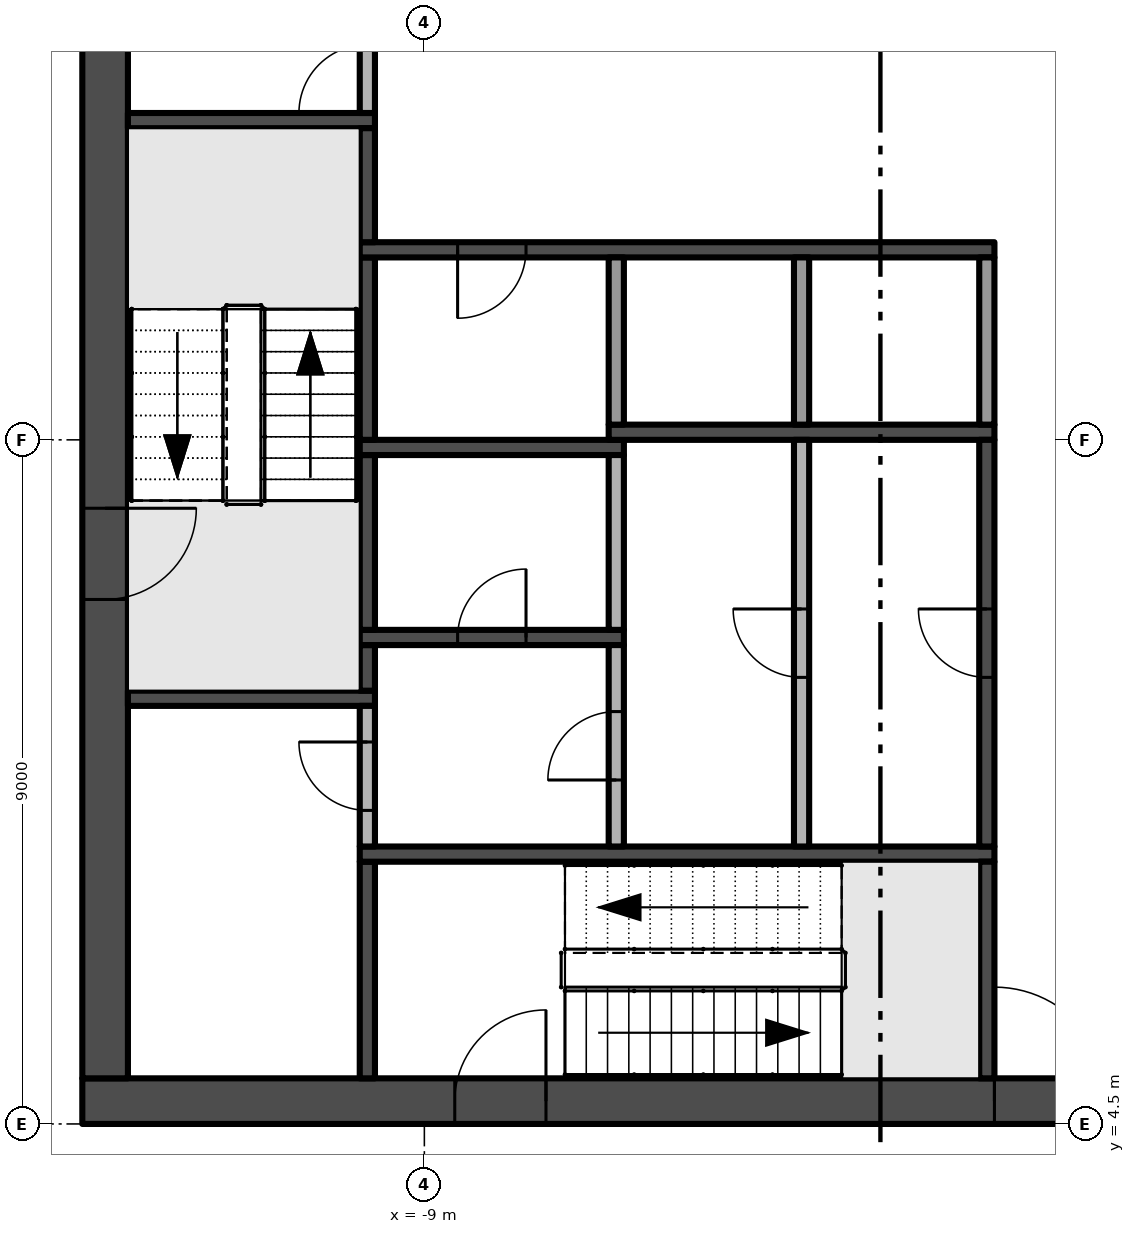
"""IFC4 building model, lengths in metres.
Left out: names, types, materials, properties, quantities, classifications, styles, units other than length and angle.
Written with IfcOpenShell. Run it as: python <this file> out.ifc"""

import sys

from ifc_helpers import new_model, si_unit, direction, frame, frame_2d, origin, place, context, subcontext, project, spatial, rectangle, extrude, element, fill, save


model = new_model("IFC4")
c1 = context("Model", 3, precision=1e-05, world=origin(), true_north=direction((0.0, 1.0)))
c2 = subcontext(c1, "Body", "Model", "MODEL_VIEW")
j1 = project(units=[si_unit("LENGTHUNIT", "METRE"), si_unit("PLANEANGLEUNIT", "RADIAN")], contexts=[c1])
p1 = place(None, origin())
s1 = spatial("IfcSite", under=j1, at=p1, CompositionType="ELEMENT")
p2 = place(p1, origin())
s2 = spatial("IfcBuilding", under=s1, at=p2, CompositionType="ELEMENT")
p3 = place(p2, frame((0.0, 0.0, 233.8)))
s3 = spatial("IfcBuildingStorey", under=s2, at=p3, CompositionType="ELEMENT", Elevation=233.8)
p4 = place(p3, frame((-13.5, 4.8, -0.3), z_axis=(0.0, 0.0, 1.0), x_axis=(1.0, 0.0, 0.0)))
e1 = element("IfcWall", 1, at=p4, inside=s3, PredefinedType="SHEAR", context=c2, shape_type="SweptSolid", body=[
    extrude(rectangle(XDim=27.0, YDim=0.6, at=frame_2d((13.5, 0.0))), origin(), (0.0, 0.0, 1.0), 5.0),
])
p5 = place(p4, frame((12.0, 0.0, 0.3)))
e2 = element("IfcOpeningElement", 2, at=p5, cuts=e1, PredefinedType="OPENING", context=c2, shape_type="SweptSolid", body=[
    extrude(rectangle(XDim=3.0, YDim=2.4, at=frame_2d((1.5, 1.2))), frame((0.0, 0.31, 0.0), z_axis=(0.0, -1.0, 0.0), x_axis=(1.0, 0.0, 0.0)), (0.0, 0.0, 1.0), 0.62),
])
p6 = place(p4, frame((4.9, 0.0, 0.3)))
e3 = element("IfcOpeningElement", 3, at=p6, cuts=e1, PredefinedType="OPENING", context=c2, shape_type="SweptSolid", body=[
    extrude(rectangle(XDim=1.2, YDim=2.2, at=frame_2d((0.6, 1.1))), frame((0.0, 0.31, 0.0), z_axis=(0.0, -1.0, 0.0), x_axis=(1.0, 0.0, 0.0)), (0.0, 0.0, 1.0), 0.62),
])
p7 = place(p4, frame((20.75, 0.0, 0.3)))
e4 = element("IfcOpeningElement", 4, at=p7, cuts=e1, PredefinedType="OPENING", context=c2, shape_type="SweptSolid", body=[
    extrude(rectangle(XDim=1.5, YDim=2.2, at=frame_2d((0.75, 1.1))), frame((0.0, 0.31, 0.0), z_axis=(0.0, -1.0, 0.0), x_axis=(1.0, 0.0, 0.0)), (0.0, 0.0, 1.0), 0.62),
])
p8 = place(p4, frame((17.4, 0.0, 0.3)))
e5 = element("IfcOpeningElement", 5, at=p8, cuts=e1, PredefinedType="OPENING", context=c2, shape_type="SweptSolid", body=[
    extrude(rectangle(XDim=1.2, YDim=2.2, at=frame_2d((0.6, 1.1))), frame((0.0, 0.31, 0.0), z_axis=(0.0, -1.0, 0.0), x_axis=(1.0, 0.0, 0.0)), (0.0, 0.0, 1.0), 0.62),
])
p9 = place(p3, frame((-13.2, 21.9, -0.3), z_axis=(0.0, 0.0, 1.0), x_axis=(0.0, -1.0, 0.0)))
e6 = element("IfcWall", 6, at=p9, inside=s3, PredefinedType="SHEAR", context=c2, shape_type="SweptSolid", body=[
    extrude(rectangle(XDim=16.8, YDim=0.6, at=frame_2d((8.4, 0.0))), origin(), (0.0, 0.0, 1.0), 5.0),
])
p10 = place(p9, frame((9.3, 0.0, 0.3)))
e7 = element("IfcOpeningElement", 7, at=p10, cuts=e6, PredefinedType="OPENING", context=c2, shape_type="SweptSolid", body=[
    extrude(rectangle(XDim=1.2, YDim=2.2, at=frame_2d((0.6, 1.1))), frame((0.0, 0.31, 0.0), z_axis=(0.0, -1.0, 0.0), x_axis=(1.0, 0.0, 0.0)), (0.0, 0.0, 1.0), 0.62),
])
for number, where, z_axis, x_axis in (
    (8, (-12.9, 10.1, 0.0), (0.0, 0.0, 1.0), (1.0, 0.0, 0.0)),
    (9, (-12.9, 17.7, 0.0), (0.0, 0.0, 1.0), (1.0, 0.0, 0.0)),
):
    element("IfcWall", number, at=place(p3, frame(where, z_axis=z_axis, x_axis=x_axis)), inside=s3, PredefinedType="SHEAR", context=c2, shape_type="SweptSolid", body=[
        extrude(rectangle(XDim=3.25, YDim=0.2, at=frame_2d((1.625, 0.0))), origin(), (0.0, 0.0, 1.0), 4.7),
    ])
p11 = place(p3, frame((-9.75, 5.1, 0.0), z_axis=(0.0, 0.0, 1.0), x_axis=(0.0, 1.0, 0.0)))
e10 = element("IfcWall", 10, at=p11, inside=s3, PredefinedType="SHEAR", context=c2, shape_type="SweptSolid", body=[
    extrude(rectangle(XDim=2.85, YDim=0.2, at=frame_2d((1.425, 0.0))), origin(), (0.0, 0.0, 1.0), 4.7),
])
p12 = place(p3, frame((-9.85, 8.05, 0.0), z_axis=(0.0, 0.0, 1.0), x_axis=(1.0, 0.0, 0.0)))
e11 = element("IfcWall", 11, at=p12, inside=s3, PredefinedType="SHEAR", context=c2, shape_type="SweptSolid", body=[
    extrude(rectangle(XDim=8.35, YDim=0.2, at=frame_2d((4.175, 0.0))), origin(), (0.0, 0.0, 1.0), 4.7),
])
p13 = place(p3, frame((-9.75, 8.15, 0.0), z_axis=(0.0, 0.0, 1.0), x_axis=(0.0, 1.0, 0.0)))
e12 = element("IfcWall", 12, at=p13, inside=s3, PredefinedType="PARTITIONING", context=c2, shape_type="SweptSolid", body=[
    extrude(rectangle(XDim=1.85, YDim=0.2, at=frame_2d((0.925, 0.0))), origin(), (0.0, 0.0, 1.0), 4.7),
])
p14 = place(p13, frame((0.475, 0.0, 0.0)))
e13 = element("IfcOpeningElement", 13, at=p14, cuts=e12, PredefinedType="OPENING", context=c2, shape_type="SweptSolid", body=[
    extrude(rectangle(XDim=0.9, YDim=2.1, at=frame_2d((0.45, 1.05))), frame((0.0, 0.11, 0.0), z_axis=(0.0, -1.0, 0.0), x_axis=(1.0, 0.0, 0.0)), (0.0, 0.0, 1.0), 0.22),
])
p15 = place(p3, frame((-9.75, 10.2, 0.0), z_axis=(0.0, 0.0, 1.0), x_axis=(0.0, 1.0, 0.0)))
e14 = element("IfcWall", 14, at=p15, inside=s3, PredefinedType="SHEAR", context=c2, shape_type="SweptSolid", body=[
    extrude(rectangle(XDim=0.6, YDim=0.2, at=frame_2d((0.3, 0.0))), origin(), (0.0, 0.0, 1.0), 4.7),
])
p16 = place(p3, frame((-9.85, 10.9, 0.0), z_axis=(0.0, 0.0, 1.0), x_axis=(1.0, 0.0, 0.0)))
e15 = element("IfcWall", 15, at=p16, inside=s3, PredefinedType="SHEAR", context=c2, shape_type="SweptSolid", body=[
    extrude(rectangle(XDim=3.475, YDim=0.2, at=frame_2d((1.738, 0.0))), origin(), (0.0, 0.0, 1.0), 4.7),
])
p17 = place(p16, frame((1.288, 0.0, 0.0)))
e16 = element("IfcOpeningElement", 16, at=p17, cuts=e15, PredefinedType="OPENING", context=c2, shape_type="SweptSolid", body=[
    extrude(rectangle(XDim=0.9, YDim=2.1, at=frame_2d((0.45, 1.05))), frame((0.0, 0.11, 0.0), z_axis=(0.0, -1.0, 0.0), x_axis=(1.0, 0.0, 0.0)), (0.0, 0.0, 1.0), 0.22),
])
p18 = place(p3, frame((-9.75, 11.0, 0.0), z_axis=(0.0, 0.0, 1.0), x_axis=(0.0, 1.0, 0.0)))
e17 = element("IfcWall", 17, at=p18, inside=s3, PredefinedType="SHEAR", context=c2, shape_type="SweptSolid", body=[
    extrude(rectangle(XDim=2.3, YDim=0.2, at=frame_2d((1.15, 0.0))), origin(), (0.0, 0.0, 1.0), 4.7),
])
p19 = place(p3, frame((-9.85, 13.4, 0.0), z_axis=(0.0, 0.0, 1.0), x_axis=(1.0, 0.0, 0.0)))
e18 = element("IfcWall", 18, at=p19, inside=s3, PredefinedType="SHEAR", context=c2, shape_type="SweptSolid", body=[
    extrude(rectangle(XDim=3.475, YDim=0.2, at=frame_2d((1.738, 0.0))), origin(), (0.0, 0.0, 1.0), 4.7),
])
p20 = place(p3, frame((-9.75, 13.5, 0.0), z_axis=(0.0, 0.0, 1.0), x_axis=(0.0, 1.0, 0.0)))
e19 = element("IfcWall", 19, at=p20, inside=s3, PredefinedType="SHEAR", context=c2, shape_type="SweptSolid", body=[
    extrude(rectangle(XDim=2.4, YDim=0.2, at=frame_2d((1.2, 0.0))), origin(), (0.0, 0.0, 1.0), 4.7),
])
p21 = place(p3, frame((-1.5, 16.0, 0.0), z_axis=(0.0, 0.0, 1.0), x_axis=(-1.0, 0.0, 0.0)))
e20 = element("IfcWall", 20, at=p21, inside=s3, PredefinedType="SHEAR", context=c2, shape_type="SweptSolid", body=[
    extrude(rectangle(XDim=8.35, YDim=0.2, at=frame_2d((4.175, 0.0))), origin(), (0.0, 0.0, 1.0), 4.7),
])
p22 = place(p21, frame((6.162, 0.0, 0.0)))
e21 = element("IfcOpeningElement", 21, at=p22, cuts=e20, PredefinedType="OPENING", context=c2, shape_type="SweptSolid", body=[
    extrude(rectangle(XDim=0.9, YDim=2.1, at=frame_2d((0.45, 1.05))), frame((0.0, 0.11, 0.0), z_axis=(0.0, -1.0, 0.0), x_axis=(1.0, 0.0, 0.0)), (0.0, 0.0, 1.0), 0.22),
])
p23 = place(p3, frame((-9.75, 16.1, 0.0), z_axis=(0.0, 0.0, 1.0), x_axis=(0.0, 1.0, 0.0)))
e22 = element("IfcWall", 22, at=p23, inside=s3, PredefinedType="SHEAR", context=c2, shape_type="SweptSolid", body=[
    extrude(rectangle(XDim=1.5, YDim=0.2, at=frame_2d((0.75, 0.0))), origin(), (0.0, 0.0, 1.0), 4.7),
])
p24 = place(p3, frame((-9.75, 17.8, 0.0), z_axis=(0.0, 0.0, 1.0), x_axis=(0.0, 1.0, 0.0)))
e23 = element("IfcWall", 23, at=p24, inside=s3, PredefinedType="PARTITIONING", context=c2, shape_type="SweptSolid", body=[
    extrude(rectangle(XDim=1.4, YDim=0.2, at=frame_2d((0.7, 0.0))), origin(), (0.0, 0.0, 1.0), 4.7),
])
p25 = place(p24, origin())
e24 = element("IfcOpeningElement", 24, at=p25, cuts=e23, PredefinedType="OPENING", context=c2, shape_type="SweptSolid", body=[
    extrude(rectangle(XDim=0.9, YDim=2.1, at=frame_2d((0.45, 1.05))), frame((0.0, 0.11, 0.0), z_axis=(0.0, -1.0, 0.0), x_axis=(1.0, 0.0, 0.0)), (0.0, 0.0, 1.0), 0.22),
])
p26 = place(p3, frame((-6.475, 8.15, 0.0), z_axis=(0.0, 0.0, 1.0), x_axis=(0.0, 1.0, 0.0)))
e25 = element("IfcWall", 25, at=p26, inside=s3, PredefinedType="PARTITIONING", context=c2, shape_type="SweptSolid", body=[
    extrude(rectangle(XDim=2.65, YDim=0.2, at=frame_2d((1.325, 0.0))), origin(), (0.0, 0.0, 1.0), 4.7),
])
p27 = place(p26, frame((0.875, 0.0, 0.0)))
e26 = element("IfcOpeningElement", 26, at=p27, cuts=e25, PredefinedType="OPENING", context=c2, shape_type="SweptSolid", body=[
    extrude(rectangle(XDim=0.9, YDim=2.1, at=frame_2d((0.45, 1.05))), frame((0.0, 0.11, 0.0), z_axis=(0.0, -1.0, 0.0), x_axis=(1.0, 0.0, 0.0)), (0.0, 0.0, 1.0), 0.22),
])
p28 = place(p3, frame((-6.475, 11.0, 0.0), z_axis=(0.0, 0.0, 1.0), x_axis=(0.0, 1.0, 0.0)))
e27 = element("IfcWall", 27, at=p28, inside=s3, PredefinedType="PARTITIONING", context=c2, shape_type="SweptSolid", body=[
    extrude(rectangle(XDim=2.3, YDim=0.2, at=frame_2d((1.15, 0.0))), origin(), (0.0, 0.0, 1.0), 4.7),
])
p29 = place(p3, frame((-6.575, 13.6, 0.0), z_axis=(0.0, 0.0, 1.0), x_axis=(1.0, 0.0, 0.0)))
e28 = element("IfcWall", 28, at=p29, inside=s3, PredefinedType="SHEAR", context=c2, shape_type="SweptSolid", body=[
    extrude(rectangle(XDim=5.075, YDim=0.2, at=frame_2d((2.538, 0.0))), origin(), (0.0, 0.0, 1.0), 4.7),
])
p30 = place(p3, frame((-6.475, 13.7, 0.0), z_axis=(0.0, 0.0, 1.0), x_axis=(0.0, 1.0, 0.0)))
e29 = element("IfcWall", 29, at=p30, inside=s3, PredefinedType="PARTITIONING", context=c2, shape_type="SweptSolid", body=[
    extrude(rectangle(XDim=2.2, YDim=0.2, at=frame_2d((1.1, 0.0))), origin(), (0.0, 0.0, 1.0), 4.7),
])
p31 = place(p3, frame((-4.037, 8.15, 0.0), z_axis=(0.0, 0.0, 1.0), x_axis=(0.0, 1.0, 0.0)))
e30 = element("IfcWall", 30, at=p31, inside=s3, PredefinedType="PARTITIONING", context=c2, shape_type="SweptSolid", body=[
    extrude(rectangle(XDim=5.35, YDim=0.2, at=frame_2d((2.675, 0.0))), origin(), (0.0, 0.0, 1.0), 4.7),
])
p32 = place(p31, frame((2.225, 0.0, 0.0)))
e31 = element("IfcOpeningElement", 31, at=p32, cuts=e30, PredefinedType="OPENING", context=c2, shape_type="SweptSolid", body=[
    extrude(rectangle(XDim=0.9, YDim=2.1, at=frame_2d((0.45, 1.05))), frame((0.0, 0.11, 0.0), z_axis=(0.0, -1.0, 0.0), x_axis=(1.0, 0.0, 0.0)), (0.0, 0.0, 1.0), 0.22),
])
p33 = place(p3, frame((-4.037, 13.7, 0.0), z_axis=(0.0, 0.0, 1.0), x_axis=(0.0, 1.0, 0.0)))
e32 = element("IfcWall", 32, at=p33, inside=s3, PredefinedType="PARTITIONING", context=c2, shape_type="SweptSolid", body=[
    extrude(rectangle(XDim=2.2, YDim=0.2, at=frame_2d((1.1, 0.0))), origin(), (0.0, 0.0, 1.0), 4.7),
])
p34 = place(p3, frame((-1.6, 5.1, 0.0), z_axis=(0.0, 0.0, 1.0), x_axis=(0.0, 1.0, 0.0)))
e33 = element("IfcWall", 33, at=p34, inside=s3, PredefinedType="SHEAR", context=c2, shape_type="SweptSolid", body=[
    extrude(rectangle(XDim=2.85, YDim=0.2, at=frame_2d((1.425, 0.0))), origin(), (0.0, 0.0, 1.0), 4.7),
])
p35 = place(p3, frame((-1.6, 8.15, 0.0), z_axis=(0.0, 0.0, 1.0), x_axis=(0.0, 1.0, 0.0)))
e34 = element("IfcWall", 34, at=p35, inside=s3, PredefinedType="SHEAR", context=c2, shape_type="SweptSolid", body=[
    extrude(rectangle(XDim=5.35, YDim=0.2, at=frame_2d((2.675, 0.0))), origin(), (0.0, 0.0, 1.0), 4.7),
])
p36 = place(p35, frame((2.225, 0.0, 0.0)))
e35 = element("IfcOpeningElement", 35, at=p36, cuts=e34, PredefinedType="OPENING", context=c2, shape_type="SweptSolid", body=[
    extrude(rectangle(XDim=0.9, YDim=2.1, at=frame_2d((0.45, 1.05))), frame((0.0, 0.11, 0.0), z_axis=(0.0, -1.0, 0.0), x_axis=(1.0, 0.0, 0.0)), (0.0, 0.0, 1.0), 0.22),
])
p37 = place(p3, frame((-1.6, 13.7, 0.0), z_axis=(0.0, 0.0, 1.0), x_axis=(0.0, 1.0, 0.0)))
e36 = element("IfcWall", 36, at=p37, inside=s3, PredefinedType="PARTITIONING", context=c2, shape_type="SweptSolid", body=[
    extrude(rectangle(XDim=2.2, YDim=0.2, at=frame_2d((1.1, 0.0))), origin(), (0.0, 0.0, 1.0), 4.7),
])
p38 = place(p5, frame((3.0, 0.0, 0.0), z_axis=(0.0, 0.0, 1.0), x_axis=(-1.0, 0.0, 0.0)))
e37 = element("IfcDoor", 37, at=p38, inside=s3, OperationType="DOUBLE_DOOR_SINGLE_SWING", PredefinedType="DOOR", context=c2, shape_type="SweptSolid", body=[
    extrude(rectangle(XDim=3.0, YDim=2.4, at=frame_2d((1.5, 1.2))), frame((0.0, 0.025, 0.0), z_axis=(0.0, -1.0, 0.0), x_axis=(1.0, 0.0, 0.0)), (0.0, 0.0, 1.0), 0.05),
])
fill(e2, e37)
p39 = place(p10, frame((1.2, 0.0, 0.0), z_axis=(0.0, 0.0, 1.0), x_axis=(-1.0, 0.0, 0.0)))
e38 = element("IfcDoor", 38, at=p39, inside=s3, OperationType="SINGLE_SWING_RIGHT", PredefinedType="DOOR", context=c2, shape_type="SweptSolid", body=[
    extrude(rectangle(XDim=1.2, YDim=2.2, at=frame_2d((0.6, 1.1))), frame((0.0, 0.025, 0.0), z_axis=(0.0, -1.0, 0.0), x_axis=(1.0, 0.0, 0.0)), (0.0, 0.0, 1.0), 0.05),
])
fill(e7, e38)
p40 = place(p6, frame((1.2, 0.0, 0.0), z_axis=(0.0, 0.0, 1.0), x_axis=(-1.0, 0.0, 0.0)))
e39 = element("IfcDoor", 39, at=p40, inside=s3, OperationType="SINGLE_SWING_LEFT", PredefinedType="DOOR", context=c2, shape_type="SweptSolid", body=[
    extrude(rectangle(XDim=1.2, YDim=2.2, at=frame_2d((0.6, 1.1))), frame((0.0, 0.025, 0.0), z_axis=(0.0, -1.0, 0.0), x_axis=(1.0, 0.0, 0.0)), (0.0, 0.0, 1.0), 0.05),
])
fill(e3, e39)
p41 = place(p22, origin())
e40 = element("IfcDoor", 40, at=p41, inside=s3, OperationType="SINGLE_SWING_RIGHT", PredefinedType="DOOR", context=c2, shape_type="SweptSolid", body=[
    extrude(rectangle(XDim=0.9, YDim=2.1, at=frame_2d((0.45, 1.05))), frame((0.0, 0.025, 0.0), z_axis=(0.0, -1.0, 0.0), x_axis=(1.0, 0.0, 0.0)), (0.0, 0.0, 1.0), 0.05),
])
fill(e21, e40)
p42 = place(p36, origin())
e41 = element("IfcDoor", 41, at=p42, inside=s3, OperationType="SINGLE_SWING_RIGHT", PredefinedType="DOOR", context=c2, shape_type="SweptSolid", body=[
    extrude(rectangle(XDim=0.9, YDim=2.1, at=frame_2d((0.45, 1.05))), frame((0.0, 0.025, 0.0), z_axis=(0.0, -1.0, 0.0), x_axis=(1.0, 0.0, 0.0)), (0.0, 0.0, 1.0), 0.05),
])
fill(e35, e41)
p43 = place(p25, origin())
e42 = element("IfcDoor", 42, at=p43, inside=s3, OperationType="SINGLE_SWING_LEFT", PredefinedType="DOOR", context=c2, shape_type="SweptSolid", body=[
    extrude(rectangle(XDim=0.9, YDim=2.1, at=frame_2d((0.45, 1.05))), frame((0.0, 0.025, 0.0), z_axis=(0.0, -1.0, 0.0), x_axis=(1.0, 0.0, 0.0)), (0.0, 0.0, 1.0), 0.05),
])
fill(e24, e42)
p44 = place(p32, origin())
e43 = element("IfcDoor", 43, at=p44, inside=s3, OperationType="SINGLE_SWING_RIGHT", PredefinedType="DOOR", context=c2, shape_type="SweptSolid", body=[
    extrude(rectangle(XDim=0.9, YDim=2.1, at=frame_2d((0.45, 1.05))), frame((0.0, 0.025, 0.0), z_axis=(0.0, -1.0, 0.0), x_axis=(1.0, 0.0, 0.0)), (0.0, 0.0, 1.0), 0.05),
])
fill(e31, e43)
p45 = place(p27, origin())
e44 = element("IfcDoor", 44, at=p45, inside=s3, OperationType="SINGLE_SWING_LEFT", PredefinedType="DOOR", context=c2, shape_type="SweptSolid", body=[
    extrude(rectangle(XDim=0.9, YDim=2.1, at=frame_2d((0.45, 1.05))), frame((0.0, 0.025, 0.0), z_axis=(0.0, -1.0, 0.0), x_axis=(1.0, 0.0, 0.0)), (0.0, 0.0, 1.0), 0.05),
])
fill(e26, e44)
p46 = place(p17, origin())
e45 = element("IfcDoor", 45, at=p46, inside=s3, OperationType="SINGLE_SWING_RIGHT", PredefinedType="DOOR", context=c2, shape_type="SweptSolid", body=[
    extrude(rectangle(XDim=0.9, YDim=2.1, at=frame_2d((0.45, 1.05))), frame((0.0, 0.025, 0.0), z_axis=(0.0, -1.0, 0.0), x_axis=(1.0, 0.0, 0.0)), (0.0, 0.0, 1.0), 0.05),
])
fill(e16, e45)
p47 = place(p14, origin())
e46 = element("IfcDoor", 46, at=p47, inside=s3, OperationType="SINGLE_SWING_RIGHT", PredefinedType="DOOR", context=c2, shape_type="SweptSolid", body=[
    extrude(rectangle(XDim=0.9, YDim=2.1, at=frame_2d((0.45, 1.05))), frame((0.0, 0.025, 0.0), z_axis=(0.0, -1.0, 0.0), x_axis=(1.0, 0.0, 0.0)), (0.0, 0.0, 1.0), 0.05),
])
fill(e13, e46)
save(model, sys.argv[1])
